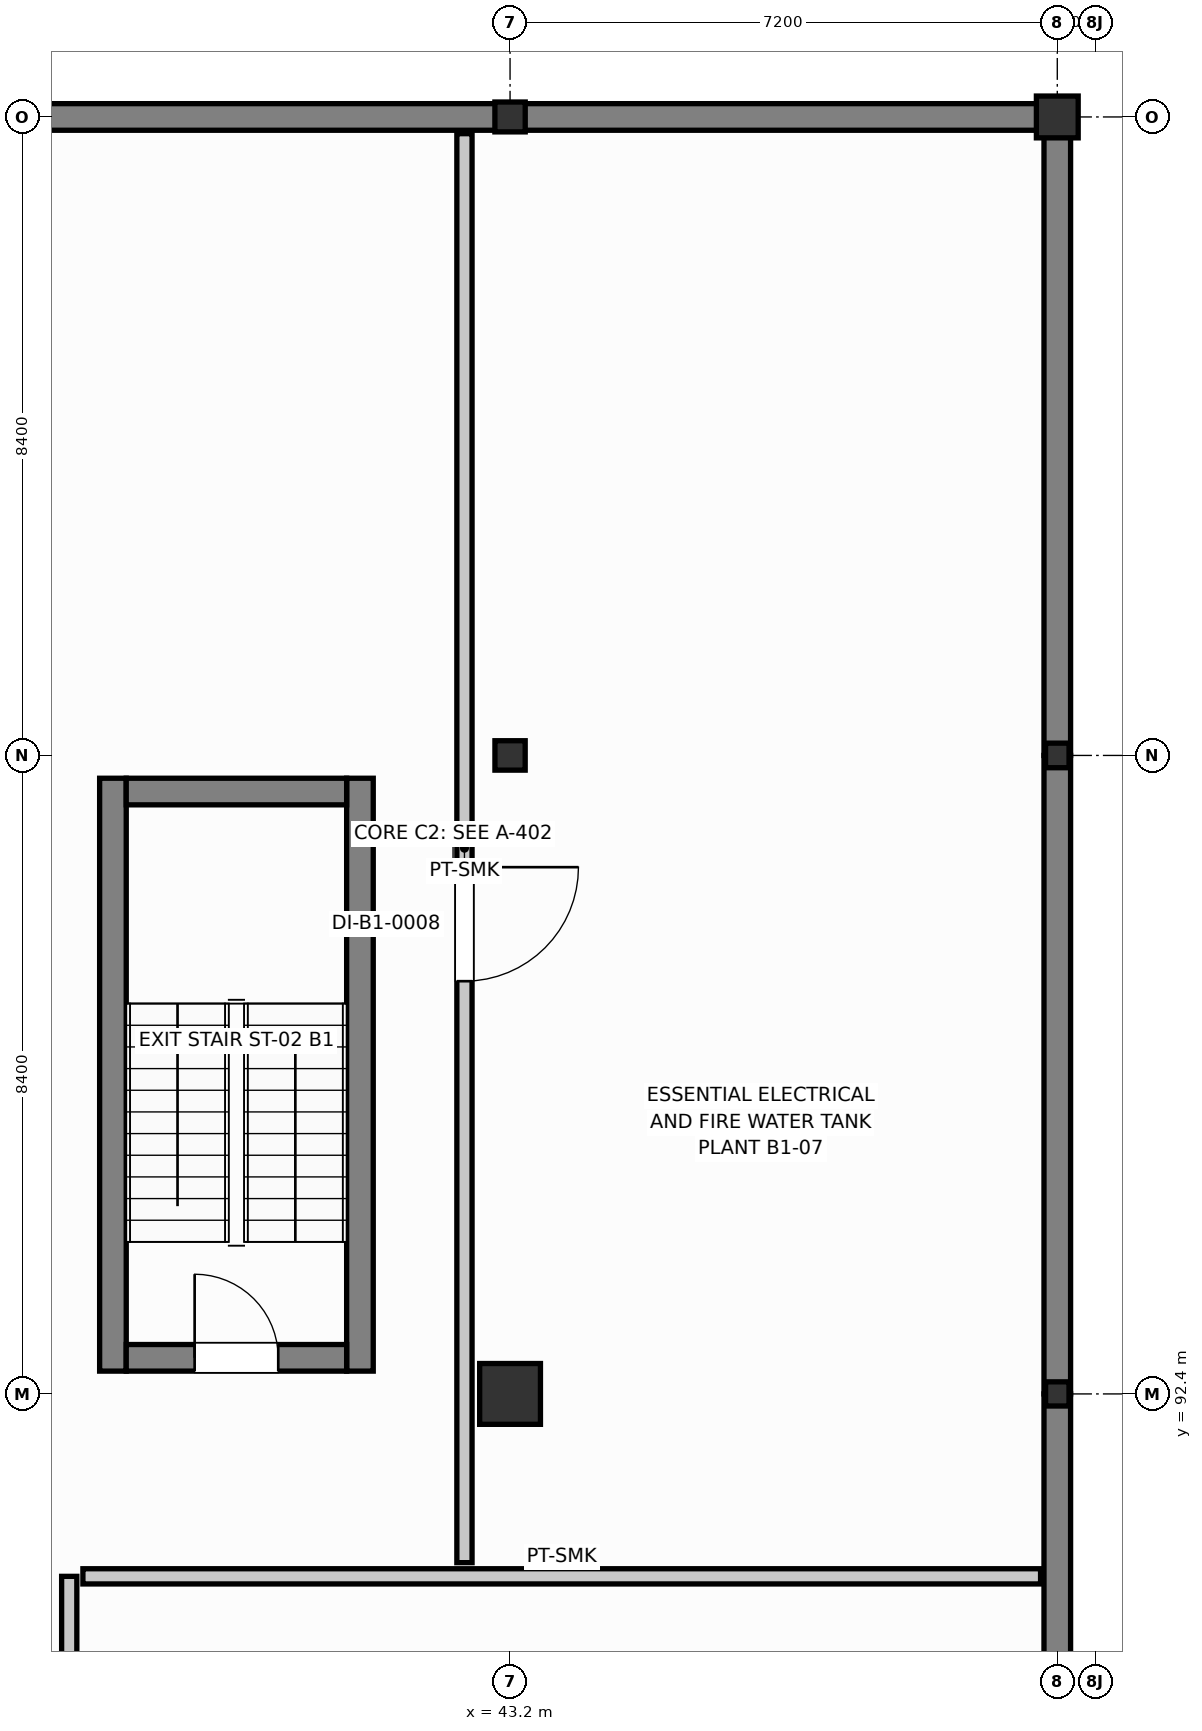
"""IFC4 building model, lengths in metres.
Left out: names, types, materials, properties, quantities, classifications, styles, units other than length and angle.
Written with IfcOpenShell. Run it as: python <this file> out.ifc"""

import sys

from ifc_helpers import new_model, si_unit, direction, frame, frame_2d, origin, origin_2d, place, context, subcontext, project, spatial, rectangle, i_section, extrude, element, fill, save


model = new_model("IFC4")
c1 = context("Model", 3, precision=1e-05, world=origin(), true_north=direction((0.0, 1.0)))
c2 = subcontext(c1, "Body", "Model", "MODEL_VIEW")
j1 = project(units=[si_unit("LENGTHUNIT", "METRE"), si_unit("PLANEANGLEUNIT", "RADIAN")], contexts=[c1])
p1 = place(None, origin())
s1 = spatial("IfcSite", under=j1, at=p1, CompositionType="ELEMENT")
p2 = place(p1, origin())
s2 = spatial("IfcBuilding", under=s1, at=p2, CompositionType="ELEMENT")
p3 = place(p2, frame((0.0, 0.0, -4.2)))
s3 = spatial("IfcBuildingStorey", under=s2, at=p3, CompositionType="ELEMENT", Elevation=-4.2)
p4 = place(p3, frame((50.4, 84.0, 0.0), z_axis=(0.0, 0.0, 1.0), x_axis=(0.0, 1.0, 0.0)))
e1 = element("IfcWall", 1, at=p4, inside=s3, PredefinedType="USERDEFINED", context=c2, shape_type="SweptSolid", body=[
    extrude(rectangle(XDim=8.4, YDim=0.35, at=frame_2d((4.2, 0.0))), origin(), (0.0, 0.0, 1.0), 3.96),
])
p5 = place(p3, frame((50.4, 92.4, 0.0), z_axis=(0.0, 0.0, 1.0), x_axis=(0.0, 1.0, 0.0)))
e2 = element("IfcWall", 2, at=p5, inside=s3, PredefinedType="USERDEFINED", context=c2, shape_type="SweptSolid", body=[
    extrude(rectangle(XDim=8.4, YDim=0.35, at=frame_2d((4.2, 0.0))), origin(), (0.0, 0.0, 1.0), 3.96),
])
p6 = place(p3, frame((50.4, 100.8, 0.0), z_axis=(0.0, 0.0, 1.0), x_axis=(0.0, 1.0, 0.0)))
e3 = element("IfcWall", 3, at=p6, inside=s3, PredefinedType="USERDEFINED", context=c2, shape_type="SweptSolid", body=[
    extrude(rectangle(XDim=8.4, YDim=0.35, at=frame_2d((4.2, 0.0))), origin(), (0.0, 0.0, 1.0), 3.96),
])
for number, where, z_axis, x_axis in (
    (4, (36.0, 109.2, 0.0), (0.0, 0.0, 1.0), (1.0, 0.0, 0.0)),
    (5, (43.2, 109.2, 0.0), (0.0, 0.0, 1.0), (1.0, 0.0, 0.0)),
):
    element("IfcWall", number, at=place(p3, frame(where, z_axis=z_axis, x_axis=x_axis)), inside=s3, PredefinedType="USERDEFINED", context=c2, shape_type="SweptSolid", body=[
        extrude(rectangle(XDim=7.2, YDim=0.35, at=frame_2d((3.6, 0.0))), origin(), (0.0, 0.0, 1.0), 3.96),
    ])
p7 = place(p3, frame((43.2, 92.4, 0.0), z_axis=(0.0, 0.0, 1.0), x_axis=(1.0, 0.0, 0.0)))
e6 = element("IfcColumn", 6, at=p7, inside=s3, PredefinedType="COLUMN", context=c2, shape_type="SweptSolid", body=[
    extrude(rectangle(XDim=0.8, YDim=0.8, at=origin_2d()), origin(), (0.0, 0.0, 1.0), 4.2),
])
p8 = place(p3, frame((43.2, 100.8, 0.0), z_axis=(0.0, 0.0, 1.0), x_axis=(1.0, 0.0, 0.0)))
e7 = element("IfcColumn", 7, at=p8, inside=s3, PredefinedType="COLUMN", context=c2, shape_type="SweptSolid", body=[
    extrude(i_section(OverallWidth=0.398, OverallDepth=0.387, WebThickness=0.021, FlangeThickness=0.033, FilletRadius=0.02, at=origin_2d()), origin(), (0.0, 0.0, 1.0), 4.2),
])
p9 = place(p3, frame((43.2, 109.2, 0.0), z_axis=(0.0, 0.0, 1.0), x_axis=(1.0, 0.0, 0.0)))
e8 = element("IfcColumn", 8, at=p9, inside=s3, PredefinedType="COLUMN", context=c2, shape_type="SweptSolid", body=[
    extrude(i_section(OverallWidth=0.399, OverallDepth=0.393, WebThickness=0.023, FlangeThickness=0.036, FilletRadius=0.02, at=origin_2d()), origin(), (0.0, 0.0, 1.0), 4.2),
])
p10 = place(p3, frame((50.4, 92.4, 0.0), z_axis=(0.0, 0.0, 1.0), x_axis=(1.0, 0.0, 0.0)))
e9 = element("IfcColumn", 9, at=p10, inside=s3, PredefinedType="COLUMN", context=c2, shape_type="SweptSolid", body=[
    extrude(i_section(OverallWidth=0.308, OverallDepth=0.318, WebThickness=0.013, FlangeThickness=0.021, FilletRadius=0.016, at=origin_2d()), origin(), (0.0, 0.0, 1.0), 4.2),
])
p11 = place(p3, frame((50.4, 100.8, 0.0), z_axis=(0.0, 0.0, 1.0), x_axis=(1.0, 0.0, 0.0)))
e10 = element("IfcColumn", 10, at=p11, inside=s3, PredefinedType="COLUMN", context=c2, shape_type="SweptSolid", body=[
    extrude(i_section(OverallWidth=0.309, OverallDepth=0.323, WebThickness=0.014, FlangeThickness=0.023, FilletRadius=0.016, at=origin_2d()), origin(), (0.0, 0.0, 1.0), 4.2),
])
p12 = place(p3, frame((50.4, 109.2, 0.0), z_axis=(0.0, 0.0, 1.0), x_axis=(1.0, 0.0, 0.0)))
e11 = element("IfcColumn", 11, at=p12, inside=s3, PredefinedType="COLUMN", context=c2, shape_type="SweptSolid", body=[
    extrude(rectangle(XDim=0.55, YDim=0.55, at=origin_2d()), origin(), (0.0, 0.0, 1.0), 4.2),
])
for number, where, z_axis, x_axis in (
    (12, (37.975, 92.7, 0.0), (0.0, 0.0, 1.0), (0.0, 1.0, 0.0)),
    (13, (41.225, 92.7, 0.0), (0.0, 0.0, 1.0), (0.0, 1.0, 0.0)),
):
    element("IfcWall", number, at=place(p3, frame(where, z_axis=z_axis, x_axis=x_axis)), inside=s3, PredefinedType="SHEAR", context=c2, shape_type="SweptSolid", body=[
        extrude(rectangle(XDim=7.8, YDim=0.35, at=frame_2d((3.9, 0.0))), origin(), (0.0, 0.0, 1.0), 3.96),
    ])
p13 = place(p3, frame((38.15, 100.325, 0.0), z_axis=(0.0, 0.0, 1.0), x_axis=(1.0, 0.0, 0.0)))
e14 = element("IfcWall", 14, at=p13, inside=s3, PredefinedType="SHEAR", context=c2, shape_type="SweptSolid", body=[
    extrude(rectangle(XDim=2.9, YDim=0.35, at=frame_2d((1.45, 0.0))), origin(), (0.0, 0.0, 1.0), 3.96),
])
p14 = place(p3, frame((38.15, 92.875, 0.0), z_axis=(0.0, 0.0, 1.0), x_axis=(1.0, 0.0, 0.0)))
e15 = element("IfcWall", 15, at=p14, inside=s3, PredefinedType="SHEAR", context=c2, shape_type="SweptSolid", body=[
    extrude(rectangle(XDim=2.9, YDim=0.35, at=frame_2d((1.45, 0.0))), origin(), (0.0, 0.0, 1.0), 3.96),
])
p15 = place(p14, frame((0.9, 0.0, 0.0)))
e16 = element("IfcOpeningElement", 16, at=p15, cuts=e15, PredefinedType="OPENING", context=c2, shape_type="SweptSolid", body=[
    extrude(rectangle(XDim=1.1, YDim=2.15, at=frame_2d((0.55, 1.075))), frame((0.0, 0.185, 0.0), z_axis=(0.0, -1.0, 0.0), x_axis=(1.0, 0.0, 0.0)), (0.0, 0.0, 1.0), 0.37),
])
p16 = place(p3, frame((37.4, 72.0, 0.0), z_axis=(0.0, 0.0, 1.0), x_axis=(0.0, 1.0, 0.0)))
e17 = element("IfcWall", 17, at=p16, inside=s3, PredefinedType="PARTITIONING", context=c2, shape_type="SweptSolid", body=[
    extrude(rectangle(XDim=18.0, YDim=0.2, at=frame_2d((9.0, 0.0))), origin(), (0.0, 0.0, 1.0), 3.535),
])
p17 = place(p16, frame((13.05, 0.0, 0.0)))
e18 = element("IfcOpeningElement", 18, at=p17, cuts=e17, PredefinedType="OPENING", context=c2, shape_type="SweptSolid", body=[
    extrude(rectangle(XDim=1.5, YDim=2.25, at=frame_2d((0.75, 1.125))), frame((0.0, 0.11, 0.0), z_axis=(0.0, -1.0, 0.0), x_axis=(1.0, 0.0, 0.0)), (0.0, 0.0, 1.0), 0.22),
])
p18 = place(p3, frame((37.58, 90.0, 0.0), z_axis=(0.0, 0.0, 1.0), x_axis=(1.0, 0.0, 0.0)))
e19 = element("IfcWall", 19, at=p18, inside=s3, PredefinedType="PARTITIONING", context=c2, shape_type="SweptSolid", body=[
    extrude(rectangle(XDim=12.6, YDim=0.2, at=frame_2d((6.3, 0.0))), origin(), (0.0, 0.0, 1.0), 3.328),
])
p19 = place(p3, frame((42.6, 90.18, 0.0), z_axis=(0.0, 0.0, 1.0), x_axis=(0.0, 1.0, 0.0)))
e20 = element("IfcWall", 20, at=p19, inside=s3, PredefinedType="PARTITIONING", context=c2, shape_type="SweptSolid", body=[
    extrude(rectangle(XDim=18.8, YDim=0.2, at=frame_2d((9.4, 0.0))), origin(), (0.0, 0.0, 1.0), 3.333),
])
p20 = place(p19, frame((7.65, 0.0, 0.0)))
e21 = element("IfcOpeningElement", 21, at=p20, cuts=e20, PredefinedType="OPENING", context=c2, shape_type="SweptSolid", body=[
    extrude(rectangle(XDim=1.5, YDim=2.25, at=frame_2d((0.75, 1.125))), frame((0.0, 0.11, 0.0), z_axis=(0.0, -1.0, 0.0), x_axis=(1.0, 0.0, 0.0)), (0.0, 0.0, 1.0), 0.22),
])
p21 = place(p15, origin())
e22 = element("IfcDoor", 22, at=p21, inside=s3, OperationType="SINGLE_SWING_LEFT", PredefinedType="DOOR", context=c2, shape_type="SweptSolid", body=[
    extrude(rectangle(XDim=1.1, YDim=2.15, at=frame_2d((0.55, 1.075))), frame((0.0, 0.025, 0.0), z_axis=(0.0, -1.0, 0.0), x_axis=(1.0, 0.0, 0.0)), (0.0, 0.0, 1.0), 0.05),
])
fill(e16, e22)
p22 = place(p20, frame((1.5, 0.0, 0.0), z_axis=(0.0, 0.0, 1.0), x_axis=(-1.0, 0.0, 0.0)))
e23 = element("IfcDoor", 23, at=p22, inside=s3, OperationType="SINGLE_SWING_LEFT", PredefinedType="DOOR", context=c2, shape_type="SweptSolid", body=[
    extrude(rectangle(XDim=1.5, YDim=2.25, at=frame_2d((0.75, 1.125))), frame((0.0, 0.025, 0.0), z_axis=(0.0, -1.0, 0.0), x_axis=(1.0, 0.0, 0.0)), (0.0, 0.0, 1.0), 0.05),
])
fill(e21, e23)
save(model, sys.argv[1])
